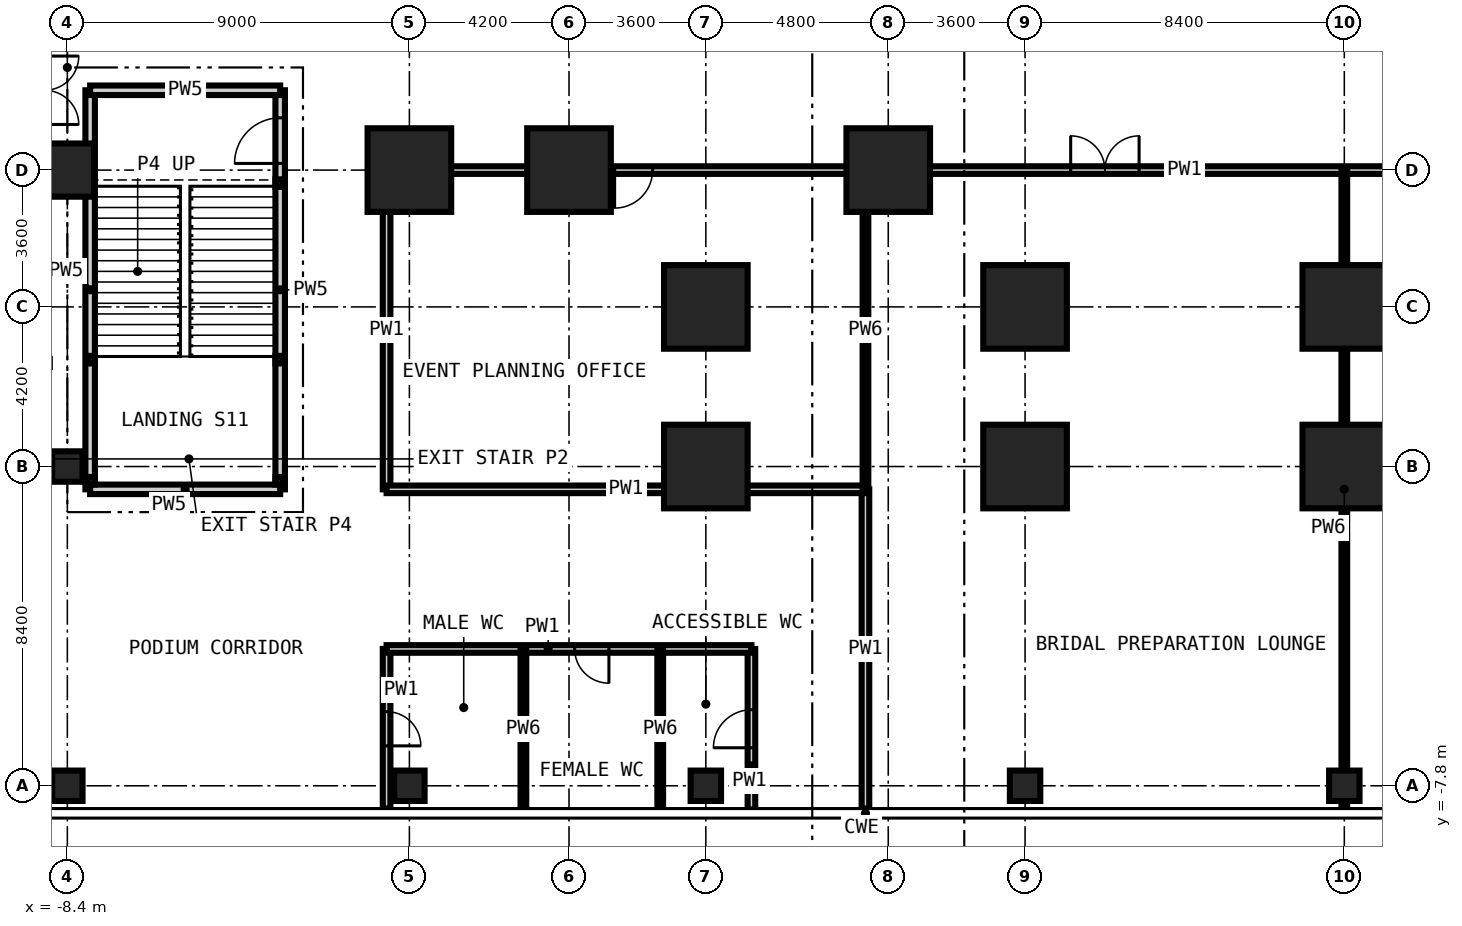
"""IFC4 building model, lengths in metres.
Left out: names, types, materials, properties, quantities, classifications, styles, units other than length and angle.
Written with IfcOpenShell. Run it as: python <this file> out.ifc"""

import sys

from ifc_helpers import new_model, si_unit, direction, frame, frame_2d, origin, origin_with_axes, origin_2d, place, context, subcontext, project, spatial, rectangle, hollow_rectangle, extrude, element, fill, save


model = new_model("IFC4")
c1 = context("Model", 3, precision=1e-05, world=origin(), true_north=direction((0.0, 1.0)))
c2 = subcontext(c1, "Body", "Model", "MODEL_VIEW")
j1 = project(units=[si_unit("LENGTHUNIT", "METRE"), si_unit("PLANEANGLEUNIT", "RADIAN")], contexts=[c1])
p1 = place(None, origin())
s1 = spatial("IfcSite", under=j1, at=p1, CompositionType="ELEMENT")
p2 = place(p1, origin())
s2 = spatial("IfcBuilding", under=s1, at=p2, CompositionType="ELEMENT")
p3 = place(p2, frame((0.0, 0.0, 6.0)))
s3 = spatial("IfcBuildingStorey", under=s2, at=p3, CompositionType="ELEMENT", Elevation=6.0)
for number, where, z_axis, x_axis in (
    (1, (0.6, 8.4, -0.3), (0.0, 0.0, 1.0), (1.0, 0.0, 0.0)),
    (2, (4.8, 8.4, -0.3), (0.0, 0.0, 1.0), (1.0, 0.0, 0.0)),
    (3, (8.4, 0.6, -0.3), (0.0, 0.0, 1.0), (1.0, 0.0, 0.0)),
    (4, (8.4, 4.8, -0.3), (0.0, 0.0, 1.0), (1.0, 0.0, 0.0)),
    (5, (13.2, 8.4, -0.3), (0.0, 0.0, 1.0), (1.0, 0.0, 0.0)),
    (6, (16.8, 0.6, -0.3), (0.0, 0.0, 1.0), (1.0, 0.0, 0.0)),
    (7, (16.8, 4.8, -0.3), (0.0, 0.0, 1.0), (1.0, 0.0, 0.0)),
    (8, (25.2, 0.6, -0.3), (0.0, 0.0, 1.0), (1.0, 0.0, 0.0)),
    (9, (25.2, 4.8, -0.3), (0.0, 0.0, 1.0), (1.0, 0.0, 0.0)),
):
    element("IfcColumn", number, at=place(p3, frame(where, z_axis=z_axis, x_axis=x_axis)), inside=s3, PredefinedType="COLUMN", context=c2, shape_type="SweptSolid", body=[
        extrude(rectangle(XDim=2.2, YDim=2.2, at=origin_2d()), origin(), (0.0, 0.0, 1.0), 6.0),
    ])
for number, where, z_axis, x_axis in (
    (10, (-8.4, -7.8, -0.3), (0.0, 0.0, 1.0), (1.0, 0.0, 0.0)),
    (11, (-8.4, 0.6, -0.3), (0.0, 0.0, 1.0), (1.0, 0.0, 0.0)),
):
    element("IfcColumn", number, at=place(p3, frame(where, z_axis=z_axis, x_axis=x_axis)), inside=s3, PredefinedType="COLUMN", context=c2, shape_type="SweptSolid", body=[
        extrude(rectangle(XDim=0.8, YDim=0.8, at=origin_2d()), origin(), (0.0, 0.0, 1.0), 6.0),
    ])
p4 = place(p3, frame((-8.4, 8.4, -0.3), z_axis=(0.0, 0.0, 1.0), x_axis=(1.0, 0.0, 0.0)))
e12 = element("IfcColumn", 12, at=p4, inside=s3, PredefinedType="COLUMN", context=c2, shape_type="SweptSolid", body=[
    extrude(rectangle(XDim=1.4, YDim=1.4, at=origin_2d()), origin(), (0.0, 0.0, 1.0), 6.0),
])
for number, where, z_axis, x_axis in (
    (13, (0.6, -7.8, -0.3), (0.0, 0.0, 1.0), (1.0, 0.0, 0.0)),
    (14, (8.4, -7.8, -0.3), (0.0, 0.0, 1.0), (1.0, 0.0, 0.0)),
    (15, (16.8, -7.8, -0.3), (0.0, 0.0, 1.0), (1.0, 0.0, 0.0)),
    (16, (25.2, -7.8, -0.3), (0.0, 0.0, 1.0), (1.0, 0.0, 0.0)),
):
    element("IfcColumn", number, at=place(p3, frame(where, z_axis=z_axis, x_axis=x_axis)), inside=s3, PredefinedType="COLUMN", context=c2, shape_type="SweptSolid", body=[
        extrude(rectangle(XDim=0.8, YDim=0.8, at=origin_2d()), origin(), (0.0, 0.0, 1.0), 6.0),
    ])
p5 = place(p3, frame((0.0, -8.4, 0.0), z_axis=(0.0, 0.0, 1.0), x_axis=(0.0, 1.0, 0.0)))
e17 = element("IfcWall", 17, at=p5, inside=s3, PredefinedType="PARTITIONING", context=c2, shape_type="SweptSolid", body=[
    extrude(rectangle(XDim=4.2, YDim=0.2, at=frame_2d((2.1, 0.0))), origin(), (0.0, 0.0, 1.0), 5.7),
])
p6 = place(p5, frame((1.65, 0.0, 0.0)))
e18 = element("IfcOpeningElement", 18, at=p6, cuts=e17, PredefinedType="OPENING", context=c2, shape_type="SweptSolid", body=[
    extrude(rectangle(XDim=0.9, YDim=2.1, at=frame_2d((0.45, 1.05))), frame((0.0, 0.11, 0.0), z_axis=(0.0, -1.0, 0.0), x_axis=(1.0, 0.0, 0.0)), (0.0, 0.0, 1.0), 0.22),
])
p7 = place(p3, frame((0.0, 0.0, 0.0), z_axis=(0.0, 0.0, 1.0), x_axis=(0.0, 1.0, 0.0)))
e19 = element("IfcWall", 19, at=p7, inside=s3, PredefinedType="PARTITIONING", context=c2, shape_type="SweptSolid", body=[
    extrude(rectangle(XDim=8.4, YDim=0.2, at=frame_2d((4.2, 0.0))), origin(), (0.0, 0.0, 1.0), 5.7),
])
p8 = place(p3, frame((9.6, -8.423, 0.0), z_axis=(0.0, 0.0, 1.0), x_axis=(0.0, 1.0, 0.0)))
e20 = element("IfcWall", 20, at=p8, inside=s3, PredefinedType="PARTITIONING", context=c2, shape_type="SweptSolid", body=[
    extrude(rectangle(XDim=4.223, YDim=0.2, at=frame_2d((2.112, 0.0))), origin(), (0.0, 0.0, 1.0), 5.7),
])
p9 = place(p8, frame((1.623, 0.0, 0.0)))
e21 = element("IfcOpeningElement", 21, at=p9, cuts=e20, PredefinedType="OPENING", context=c2, shape_type="SweptSolid", body=[
    extrude(rectangle(XDim=1.0, YDim=2.1, at=frame_2d((0.5, 1.05))), frame((0.0, 0.11, 0.0), z_axis=(0.0, -1.0, 0.0), x_axis=(1.0, 0.0, 0.0)), (0.0, 0.0, 1.0), 0.22),
])
p10 = place(p3, frame((12.6, -8.4, 0.0), z_axis=(0.0, 0.0, 1.0), x_axis=(0.0, 1.0, 0.0)))
e22 = element("IfcWall", 22, at=p10, inside=s3, PredefinedType="PARTITIONING", context=c2, shape_type="SweptSolid", body=[
    extrude(rectangle(XDim=8.4, YDim=0.2, at=frame_2d((4.2, 0.0))), origin(), (0.0, 0.0, 1.0), 5.7),
])
p11 = place(p3, frame((0.0, -4.2, 0.0), z_axis=(0.0, 0.0, 1.0), x_axis=(1.0, 0.0, 0.0)))
e23 = element("IfcWall", 23, at=p11, inside=s3, PredefinedType="PARTITIONING", context=c2, shape_type="SweptSolid", body=[
    extrude(rectangle(XDim=9.6, YDim=0.2, at=frame_2d((4.8, 0.0))), origin(), (0.0, 0.0, 1.0), 5.7),
])
p12 = place(p11, frame((4.95, 0.0, 0.0)))
e24 = element("IfcOpeningElement", 24, at=p12, cuts=e23, PredefinedType="OPENING", context=c2, shape_type="SweptSolid", body=[
    extrude(rectangle(XDim=0.9, YDim=2.1, at=frame_2d((0.45, 1.05))), frame((0.0, 0.11, 0.0), z_axis=(0.0, -1.0, 0.0), x_axis=(1.0, 0.0, 0.0)), (0.0, 0.0, 1.0), 0.22),
])
p13 = place(p3, origin_with_axes())
e25 = element("IfcWall", 25, at=p13, inside=s3, PredefinedType="PARTITIONING", context=c2, shape_type="SweptSolid", body=[
    extrude(rectangle(XDim=12.6, YDim=0.2, at=frame_2d((6.3, 0.0))), origin(), (0.0, 0.0, 1.0), 5.7),
])
p14 = place(p3, frame((0.0, 8.4, 0.0), z_axis=(0.0, 0.0, 1.0), x_axis=(1.0, 0.0, 0.0)))
e26 = element("IfcWall", 26, at=p14, inside=s3, PredefinedType="PARTITIONING", context=c2, shape_type="SweptSolid", body=[
    extrude(rectangle(XDim=42.0, YDim=0.2, at=frame_2d((21.0, 0.0))), origin(), (0.0, 0.0, 1.0), 5.7),
])
p15 = place(p14, frame((6.0, 0.0, 0.0)))
e27 = element("IfcOpeningElement", 27, at=p15, cuts=e26, PredefinedType="OPENING", context=c2, shape_type="SweptSolid", body=[
    extrude(rectangle(XDim=1.0, YDim=2.1, at=frame_2d((0.5, 1.05))), frame((0.0, 0.11, 0.0), z_axis=(0.0, -1.0, 0.0), x_axis=(1.0, 0.0, 0.0)), (0.0, 0.0, 1.0), 0.22),
])
p16 = place(p14, frame((18.0, 0.0, 0.0)))
e28 = element("IfcOpeningElement", 28, at=p16, cuts=e26, PredefinedType="OPENING", context=c2, shape_type="SweptSolid", body=[
    extrude(rectangle(XDim=1.8, YDim=2.4, at=frame_2d((0.9, 1.2))), frame((0.0, 0.11, 0.0), z_axis=(0.0, -1.0, 0.0), x_axis=(1.0, 0.0, 0.0)), (0.0, 0.0, 1.0), 0.22),
])
p17 = place(p14, frame((28.9, 0.0, 0.0)))
e29 = element("IfcOpeningElement", 29, at=p17, cuts=e26, PredefinedType="OPENING", context=c2, shape_type="SweptSolid", body=[
    extrude(rectangle(XDim=1.0, YDim=2.1, at=frame_2d((0.5, 1.05))), frame((0.0, 0.11, 0.0), z_axis=(0.0, -1.0, 0.0), x_axis=(1.0, 0.0, 0.0)), (0.0, 0.0, 1.0), 0.22),
])
for number, where, z_axis, x_axis in (
    (30, (3.6, -8.423, 0.0), (0.0, 0.0, 1.0), (0.0, 1.0, 0.0)),
    (31, (7.2, -8.423, 0.0), (0.0, 0.0, 1.0), (0.0, 1.0, 0.0)),
):
    element("IfcWall", number, at=place(p3, frame(where, z_axis=z_axis, x_axis=x_axis)), inside=s3, PredefinedType="PARTITIONING", context=c2, shape_type="SweptSolid", body=[
        extrude(rectangle(XDim=4.223, YDim=0.15, at=frame_2d((2.112, 0.0))), origin(), (0.0, 0.0, 1.0), 5.7),
    ])
p18 = place(p3, frame((12.6, 0.0, 0.0), z_axis=(0.0, 0.0, 1.0), x_axis=(0.0, 1.0, 0.0)))
e32 = element("IfcWall", 32, at=p18, inside=s3, PredefinedType="PARTITIONING", context=c2, shape_type="SweptSolid", body=[
    extrude(rectangle(XDim=8.4, YDim=0.15, at=frame_2d((4.2, 0.0))), origin(), (0.0, 0.0, 1.0), 5.7),
])
p19 = place(p3, frame((25.2, -8.4, 0.0), z_axis=(0.0, 0.0, 1.0), x_axis=(0.0, 1.0, 0.0)))
e33 = element("IfcWall", 33, at=p19, inside=s3, PredefinedType="PARTITIONING", context=c2, shape_type="SweptSolid", body=[
    extrude(rectangle(XDim=16.8, YDim=0.15, at=frame_2d((8.4, 0.0))), origin(), (0.0, 0.0, 1.0), 5.7),
])
p20 = place(p3, frame((-7.8, 0.0, 0.0), z_axis=(0.0, 0.0, 1.0), x_axis=(0.0, 1.0, 0.0)))
e34 = element("IfcWall", 34, at=p20, inside=s3, PredefinedType="PARTITIONING", context=c2, shape_type="SweptSolid", body=[
    extrude(rectangle(XDim=10.5, YDim=0.25, at=frame_2d((5.25, 0.0))), origin(), (0.0, 0.0, 1.0), 5.7),
])
p21 = place(p3, frame((-2.8, 0.0, 0.0), z_axis=(0.0, 0.0, 1.0), x_axis=(0.0, 1.0, 0.0)))
e35 = element("IfcWall", 35, at=p21, inside=s3, PredefinedType="PARTITIONING", context=c2, shape_type="SweptSolid", body=[
    extrude(rectangle(XDim=10.5, YDim=0.25, at=frame_2d((5.25, 0.0))), origin(), (0.0, 0.0, 1.0), 5.7),
])
p22 = place(p21, frame((8.575, 0.0, 0.0)))
e36 = element("IfcOpeningElement", 36, at=p22, cuts=e35, PredefinedType="OPENING", context=c2, shape_type="SweptSolid", body=[
    extrude(rectangle(XDim=1.2, YDim=2.2, at=frame_2d((0.6, 1.1))), frame((0.0, 0.135, 0.0), z_axis=(0.0, -1.0, 0.0), x_axis=(1.0, 0.0, 0.0)), (0.0, 0.0, 1.0), 0.27),
])
for number, where, z_axis, x_axis in (
    (37, (-7.8, 0.0, 0.0), (0.0, 0.0, 1.0), (1.0, 0.0, 0.0)),
    (38, (-7.8, 10.5, 0.0), (0.0, 0.0, 1.0), (1.0, 0.0, 0.0)),
):
    element("IfcWall", number, at=place(p3, frame(where, z_axis=z_axis, x_axis=x_axis)), inside=s3, PredefinedType="PARTITIONING", context=c2, shape_type="SweptSolid", body=[
        extrude(rectangle(XDim=5.0, YDim=0.25, at=frame_2d((2.5, 0.0))), origin(), (0.0, 0.0, 1.0), 5.7),
    ])
for number, where, z_axis, x_axis in (
    (39, (-2.825, 8.058, -0.3), (0.0, 0.0, 1.0), (1.0, 0.0, 0.0)),
    (40, (-7.775, 3.413, -0.3), (0.0, 0.0, 1.0), (1.0, 0.0, 0.0)),
    (41, (-2.825, 3.413, -0.3), (0.0, 0.0, 1.0), (1.0, 0.0, 0.0)),
    (42, (-7.775, 0.225, -0.3), (0.0, 0.0, 1.0), (1.0, 0.0, 0.0)),
    (43, (-2.825, 0.225, -0.3), (0.0, 0.0, 1.0), (1.0, 0.0, 0.0)),
):
    element("IfcColumn", number, at=place(p3, frame(where, z_axis=z_axis, x_axis=x_axis)), inside=s3, PredefinedType="COLUMN", context=c2, shape_type="SweptSolid", body=[
        extrude(hollow_rectangle(XDim=0.2, YDim=0.2, WallThickness=0.01, at=origin_2d()), origin(), (0.0, 0.0, 1.0), 6.0),
    ])
p23 = place(p22, origin())
e44 = element("IfcDoor", 44, at=p23, inside=s3, OperationType="SINGLE_SWING_LEFT", PredefinedType="DOOR", context=c2, shape_type="SweptSolid", body=[
    extrude(rectangle(XDim=1.2, YDim=2.2, at=frame_2d((0.6, 1.1))), frame((0.0, 0.025, 0.0), z_axis=(0.0, -1.0, 0.0), x_axis=(1.0, 0.0, 0.0)), (0.0, 0.0, 1.0), 0.05),
])
fill(e36, e44)
p24 = place(p6, frame((0.9, 0.0, 0.0), z_axis=(0.0, 0.0, 1.0), x_axis=(-1.0, 0.0, 0.0)))
e45 = element("IfcDoor", 45, at=p24, inside=s3, OperationType="SINGLE_SWING_RIGHT", PredefinedType="DOOR", context=c2, shape_type="SweptSolid", body=[
    extrude(rectangle(XDim=0.9, YDim=2.1, at=frame_2d((0.45, 1.05))), frame((0.0, 0.025, 0.0), z_axis=(0.0, -1.0, 0.0), x_axis=(1.0, 0.0, 0.0)), (0.0, 0.0, 1.0), 0.05),
])
fill(e18, e45)
p25 = place(p12, frame((0.9, 0.0, 0.0), z_axis=(0.0, 0.0, 1.0), x_axis=(-1.0, 0.0, 0.0)))
e46 = element("IfcDoor", 46, at=p25, inside=s3, OperationType="SINGLE_SWING_LEFT", PredefinedType="DOOR", context=c2, shape_type="SweptSolid", body=[
    extrude(rectangle(XDim=0.9, YDim=2.1, at=frame_2d((0.45, 1.05))), frame((0.0, 0.025, 0.0), z_axis=(0.0, -1.0, 0.0), x_axis=(1.0, 0.0, 0.0)), (0.0, 0.0, 1.0), 0.05),
])
fill(e24, e46)
p26 = place(p9, origin())
e47 = element("IfcDoor", 47, at=p26, inside=s3, OperationType="SINGLE_SWING_LEFT", PredefinedType="DOOR", context=c2, shape_type="SweptSolid", body=[
    extrude(rectangle(XDim=1.0, YDim=2.1, at=frame_2d((0.5, 1.05))), frame((0.0, 0.025, 0.0), z_axis=(0.0, -1.0, 0.0), x_axis=(1.0, 0.0, 0.0)), (0.0, 0.0, 1.0), 0.05),
])
fill(e21, e47)
p27 = place(p15, frame((1.0, 0.0, 0.0), z_axis=(0.0, 0.0, 1.0), x_axis=(-1.0, 0.0, 0.0)))
e48 = element("IfcDoor", 48, at=p27, inside=s3, OperationType="SINGLE_SWING_RIGHT", PredefinedType="DOOR", context=c2, shape_type="SweptSolid", body=[
    extrude(rectangle(XDim=1.0, YDim=2.1, at=frame_2d((0.5, 1.05))), frame((0.0, 0.025, 0.0), z_axis=(0.0, -1.0, 0.0), x_axis=(1.0, 0.0, 0.0)), (0.0, 0.0, 1.0), 0.05),
])
fill(e27, e48)
p28 = place(p16, origin())
e49 = element("IfcDoor", 49, at=p28, inside=s3, OperationType="DOUBLE_DOOR_DOUBLE_SWING", PredefinedType="DOOR", context=c2, shape_type="SweptSolid", body=[
    extrude(rectangle(XDim=1.8, YDim=2.4, at=frame_2d((0.9, 1.2))), frame((0.0, 0.025, 0.0), z_axis=(0.0, -1.0, 0.0), x_axis=(1.0, 0.0, 0.0)), (0.0, 0.0, 1.0), 0.05),
])
fill(e28, e49)
save(model, sys.argv[1])
